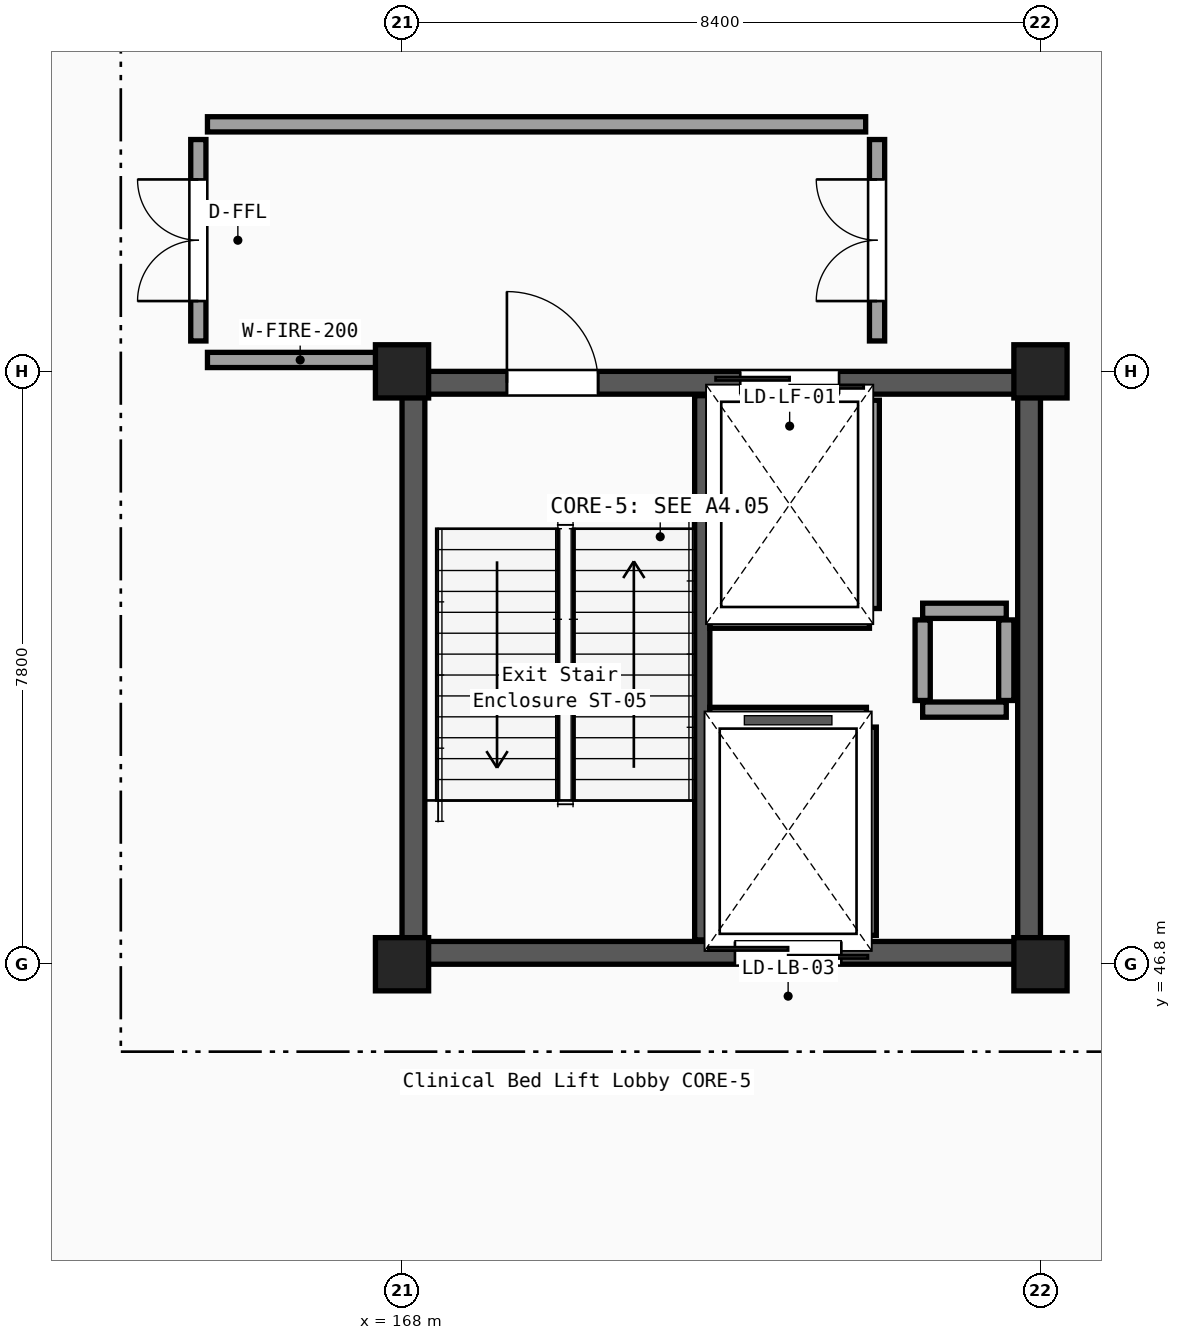
"""IFC4 building model, lengths in metres.
Left out: names, types, materials, properties, quantities, classifications, styles, units other than length and angle.
Written with IfcOpenShell. Run it as: python <this file> out.ifc"""

import sys

from ifc_helpers import new_model, si_unit, direction, frame, frame_2d, origin, origin_2d, place, context, subcontext, project, spatial, rectangle, i_section, extrude, element, fill, save


model = new_model("IFC4")
c1 = context("Model", 3, precision=1e-05, world=origin(), true_north=direction((0.0, 1.0)))
c2 = subcontext(c1, "Body", "Model", "MODEL_VIEW")
j1 = project(units=[si_unit("LENGTHUNIT", "METRE"), si_unit("PLANEANGLEUNIT", "RADIAN")], contexts=[c1])
p1 = place(None, origin())
s1 = spatial("IfcSite", under=j1, at=p1, CompositionType="ELEMENT")
p2 = place(p1, origin())
s2 = spatial("IfcBuilding", under=s1, at=p2, CompositionType="ELEMENT")
p3 = place(p2, frame((0.0, 0.0, -5.1)))
s3 = spatial("IfcBuildingStorey", under=s2, at=p3, CompositionType="ELEMENT", Elevation=-5.1)
for number, where, z_axis, x_axis in (
    (1, (168.0, 46.8, -0.22), (0.0, 0.0, 1.0), (1.0, 0.0, 0.0)),
    (2, (168.0, 54.6, -0.22), (0.0, 0.0, 1.0), (1.0, 0.0, 0.0)),
    (3, (176.4, 46.8, -0.22), (0.0, 0.0, 1.0), (1.0, 0.0, 0.0)),
    (4, (176.4, 54.6, -0.22), (0.0, 0.0, 1.0), (1.0, 0.0, 0.0)),
):
    element("IfcColumn", number, at=place(p3, frame(where, z_axis=z_axis, x_axis=x_axis)), inside=s3, PredefinedType="COLUMN", context=c2, shape_type="SweptSolid", body=[
        extrude(i_section(OverallWidth=0.3, OverallDepth=0.7, WebThickness=0.017, FlangeThickness=0.032, FilletRadius=0.027, at=origin_2d()), origin(), (0.0, 0.0, 1.0), 5.32),
    ])
p4 = place(p3, frame((168.0, 46.95, -0.22), z_axis=(0.0, 0.0, 1.0), x_axis=(1.0, 0.0, 0.0)))
e5 = element("IfcWall", 5, at=p4, inside=s3, PredefinedType="SHEAR", context=c2, shape_type="SweptSolid", body=[
    extrude(rectangle(XDim=8.4, YDim=0.3, at=frame_2d((4.2, 0.0))), origin(), (0.0, 0.0, 1.0), 5.07),
])
p5 = place(p4, frame((4.38, 0.0, 0.22)))
e6 = element("IfcOpeningElement", 6, at=p5, cuts=e5, PredefinedType="OPENING", context=c2, shape_type="SweptSolid", body=[
    extrude(rectangle(XDim=1.4, YDim=2.2, at=frame_2d((0.7, 1.1))), frame((0.0, 0.16, 0.0), z_axis=(0.0, -1.0, 0.0), x_axis=(1.0, 0.0, 0.0)), (0.0, 0.0, 1.0), 0.32),
])
p6 = place(p3, frame((168.0, 54.45, -0.22), z_axis=(0.0, 0.0, 1.0), x_axis=(1.0, 0.0, 0.0)))
e7 = element("IfcWall", 7, at=p6, inside=s3, PredefinedType="SHEAR", context=c2, shape_type="SweptSolid", body=[
    extrude(rectangle(XDim=8.4, YDim=0.3, at=frame_2d((4.2, 0.0))), origin(), (0.0, 0.0, 1.0), 5.07),
])
p7 = place(p6, frame((1.38, 0.0, 0.22)))
e8 = element("IfcOpeningElement", 8, at=p7, cuts=e7, PredefinedType="OPENING", context=c2, shape_type="SweptSolid", body=[
    extrude(rectangle(XDim=1.2, YDim=2.15, at=frame_2d((0.6, 1.075))), frame((0.0, 0.16, 0.0), z_axis=(0.0, -1.0, 0.0), x_axis=(1.0, 0.0, 0.0)), (0.0, 0.0, 1.0), 0.32),
])
p8 = place(p6, frame((4.45, 0.0, 0.22)))
e9 = element("IfcOpeningElement", 9, at=p8, cuts=e7, PredefinedType="OPENING", context=c2, shape_type="SweptSolid", body=[
    extrude(rectangle(XDim=1.3, YDim=2.2, at=frame_2d((0.65, 1.1))), frame((0.0, 0.16, 0.0), z_axis=(0.0, -1.0, 0.0), x_axis=(1.0, 0.0, 0.0)), (0.0, 0.0, 1.0), 0.32),
])
for number, where, z_axis, x_axis in (
    (10, (168.15, 47.1, -0.22), (0.0, 0.0, 1.0), (0.0, 1.0, 0.0)),
    (11, (176.25, 47.1, -0.22), (0.0, 0.0, 1.0), (0.0, 1.0, 0.0)),
):
    element("IfcWall", number, at=place(p3, frame(where, z_axis=z_axis, x_axis=x_axis)), inside=s3, PredefinedType="SHEAR", context=c2, shape_type="SweptSolid", body=[
        extrude(rectangle(XDim=7.2, YDim=0.3, at=frame_2d((3.6, 0.0))), origin(), (0.0, 0.0, 1.0), 5.07),
    ])
p9 = place(p3, frame((171.95, 47.12, -0.22), z_axis=(0.0, 0.0, 1.0), x_axis=(0.0, 1.0, 0.0)))
e12 = element("IfcWall", 12, at=p9, inside=s3, PredefinedType="SHEAR", context=c2, shape_type="SweptSolid", body=[
    extrude(rectangle(XDim=7.16, YDim=0.2, at=frame_2d((3.58, 0.0))), origin(), (0.0, 0.0, 1.0), 5.07),
])
for number, where, z_axis, x_axis in (
    (13, (174.85, 50.15, 0.0), (0.0, 0.0, 1.0), (1.0, 0.0, 0.0)),
    (14, (174.85, 51.45, 0.0), (0.0, 0.0, 1.0), (1.0, 0.0, 0.0)),
):
    element("IfcWall", number, at=place(p3, frame(where, z_axis=z_axis, x_axis=x_axis)), inside=s3, PredefinedType="PARTITIONING", context=c2, shape_type="SweptSolid", body=[
        extrude(rectangle(XDim=1.1, YDim=0.2, at=frame_2d((0.55, 0.0))), origin(), (0.0, 0.0, 1.0), 4.33),
    ])
for number, where, z_axis, x_axis in (
    (15, (174.85, 50.27, 0.0), (0.0, 0.0, 1.0), (0.0, 1.0, 0.0)),
    (16, (175.95, 50.27, 0.0), (0.0, 0.0, 1.0), (0.0, 1.0, 0.0)),
):
    element("IfcWall", number, at=place(p3, frame(where, z_axis=z_axis, x_axis=x_axis)), inside=s3, PredefinedType="PARTITIONING", context=c2, shape_type="SweptSolid", body=[
        extrude(rectangle(XDim=1.06, YDim=0.2, at=frame_2d((0.53, 0.0))), origin(), (0.0, 0.0, 1.0), 4.33),
    ])
p10 = place(p3, frame((174.18, 51.48, 0.0), z_axis=(0.0, 0.0, 1.0), x_axis=(0.0, 1.0, 0.0)))
e17 = element("IfcWall", 17, at=p10, inside=s3, PredefinedType="PARTITIONING", context=c2, shape_type="SweptSolid", body=[
    extrude(rectangle(XDim=2.74, YDim=0.2, at=frame_2d((1.37, 0.0))), origin(), (0.0, 0.0, 1.0), 4.33),
])
p11 = place(p3, frame((172.05, 51.32, 0.0), z_axis=(0.0, 0.0, 1.0), x_axis=(1.0, 0.0, 0.0)))
e18 = element("IfcWall", 18, at=p11, inside=s3, PredefinedType="PARTITIONING", context=c2, shape_type="SweptSolid", body=[
    extrude(rectangle(XDim=2.1, YDim=0.2, at=frame_2d((1.05, 0.0))), origin(), (0.0, 0.0, 1.0), 4.33),
])
p12 = place(p3, frame((174.14, 47.18, 0.0), z_axis=(0.0, 0.0, 1.0), x_axis=(0.0, 1.0, 0.0)))
e19 = element("IfcWall", 19, at=p12, inside=s3, PredefinedType="PARTITIONING", context=c2, shape_type="SweptSolid", body=[
    extrude(rectangle(XDim=2.74, YDim=0.2, at=frame_2d((1.37, 0.0))), origin(), (0.0, 0.0, 1.0), 4.33),
])
p13 = place(p3, frame((172.05, 50.08, 0.0), z_axis=(0.0, 0.0, 1.0), x_axis=(1.0, 0.0, 0.0)))
e20 = element("IfcWall", 20, at=p13, inside=s3, PredefinedType="PARTITIONING", context=c2, shape_type="SweptSolid", body=[
    extrude(rectangle(XDim=2.06, YDim=0.2, at=frame_2d((1.03, 0.0))), origin(), (0.0, 0.0, 1.0), 4.33),
])
p14 = place(p3, frame((165.44, 54.75, 0.0), z_axis=(0.0, 0.0, 1.0), x_axis=(1.0, 0.0, 0.0)))
e21 = element("IfcWall", 21, at=p14, inside=s3, PredefinedType="PARTITIONING", context=c2, shape_type="SweptSolid", body=[
    extrude(rectangle(XDim=2.44, YDim=0.2, at=frame_2d((1.22, 0.0))), origin(), (0.0, 0.0, 1.0), 4.33),
])
p15 = place(p3, frame((165.44, 57.85, 0.0), z_axis=(0.0, 0.0, 1.0), x_axis=(1.0, 0.0, 0.0)))
e22 = element("IfcWall", 22, at=p15, inside=s3, PredefinedType="PARTITIONING", context=c2, shape_type="SweptSolid", body=[
    extrude(rectangle(XDim=8.66, YDim=0.2, at=frame_2d((4.33, 0.0))), origin(), (0.0, 0.0, 1.0), 4.33),
])
p16 = place(p3, frame((165.32, 55.0, 0.0), z_axis=(0.0, 0.0, 1.0), x_axis=(0.0, 1.0, 0.0)))
e23 = element("IfcWall", 23, at=p16, inside=s3, PredefinedType="PARTITIONING", context=c2, shape_type="SweptSolid", body=[
    extrude(rectangle(XDim=2.65, YDim=0.2, at=frame_2d((1.325, 0.0))), origin(), (0.0, 0.0, 1.0), 4.33),
])
p17 = place(p16, frame((0.525, 0.0, 0.0)))
e24 = element("IfcOpeningElement", 24, at=p17, cuts=e23, PredefinedType="OPENING", context=c2, shape_type="SweptSolid", body=[
    extrude(rectangle(XDim=1.6, YDim=2.2, at=frame_2d((0.8, 1.1))), frame((0.0, 0.11, 0.0), z_axis=(0.0, -1.0, 0.0), x_axis=(1.0, 0.0, 0.0)), (0.0, 0.0, 1.0), 0.22),
])
p18 = place(p3, frame((174.25, 55.0, 0.0), z_axis=(0.0, 0.0, 1.0), x_axis=(0.0, 1.0, 0.0)))
e25 = element("IfcWall", 25, at=p18, inside=s3, PredefinedType="PARTITIONING", context=c2, shape_type="SweptSolid", body=[
    extrude(rectangle(XDim=2.65, YDim=0.2, at=frame_2d((1.325, 0.0))), origin(), (0.0, 0.0, 1.0), 4.33),
])
p19 = place(p18, frame((0.525, 0.0, 0.0)))
e26 = element("IfcOpeningElement", 26, at=p19, cuts=e25, PredefinedType="OPENING", context=c2, shape_type="SweptSolid", body=[
    extrude(rectangle(XDim=1.6, YDim=2.2, at=frame_2d((0.8, 1.1))), frame((0.0, 0.11, 0.0), z_axis=(0.0, -1.0, 0.0), x_axis=(1.0, 0.0, 0.0)), (0.0, 0.0, 1.0), 0.22),
])
p20 = place(p7, origin())
e27 = element("IfcDoor", 27, at=p20, inside=s3, OperationType="SINGLE_SWING_LEFT", PredefinedType="DOOR", context=c2, shape_type="SweptSolid", body=[
    extrude(rectangle(XDim=1.2, YDim=2.15, at=frame_2d((0.6, 1.075))), frame((0.0, 0.025, 0.0), z_axis=(0.0, -1.0, 0.0), x_axis=(1.0, 0.0, 0.0)), (0.0, 0.0, 1.0), 0.05),
])
fill(e8, e27)
p21 = place(p8, origin())
e28 = element("IfcDoor", 28, at=p21, inside=s3, OperationType="DOUBLE_DOOR_SLIDING", PredefinedType="DOOR", context=c2, shape_type="SweptSolid", body=[
    extrude(rectangle(XDim=1.3, YDim=2.2, at=frame_2d((0.65, 1.1))), frame((0.0, 0.025, 0.0), z_axis=(0.0, -1.0, 0.0), x_axis=(1.0, 0.0, 0.0)), (0.0, 0.0, 1.0), 0.05),
])
fill(e9, e28)
p22 = place(p5, origin())
e29 = element("IfcDoor", 29, at=p22, inside=s3, OperationType="DOUBLE_DOOR_SLIDING", PredefinedType="DOOR", context=c2, shape_type="SweptSolid", body=[
    extrude(rectangle(XDim=1.4, YDim=2.2, at=frame_2d((0.7, 1.1))), frame((0.0, 0.025, 0.0), z_axis=(0.0, -1.0, 0.0), x_axis=(1.0, 0.0, 0.0)), (0.0, 0.0, 1.0), 0.05),
])
fill(e6, e29)
p23 = place(p17, origin())
e30 = element("IfcDoor", 30, at=p23, inside=s3, OperationType="DOUBLE_DOOR_SINGLE_SWING", PredefinedType="DOOR", context=c2, shape_type="SweptSolid", body=[
    extrude(rectangle(XDim=1.6, YDim=2.2, at=frame_2d((0.8, 1.1))), frame((0.0, 0.025, 0.0), z_axis=(0.0, -1.0, 0.0), x_axis=(1.0, 0.0, 0.0)), (0.0, 0.0, 1.0), 0.05),
])
fill(e24, e30)
p24 = place(p19, origin())
e31 = element("IfcDoor", 31, at=p24, inside=s3, OperationType="DOUBLE_DOOR_SINGLE_SWING", PredefinedType="DOOR", context=c2, shape_type="SweptSolid", body=[
    extrude(rectangle(XDim=1.6, YDim=2.2, at=frame_2d((0.8, 1.1))), frame((0.0, 0.025, 0.0), z_axis=(0.0, -1.0, 0.0), x_axis=(1.0, 0.0, 0.0)), (0.0, 0.0, 1.0), 0.05),
])
fill(e26, e31)
save(model, sys.argv[1])
